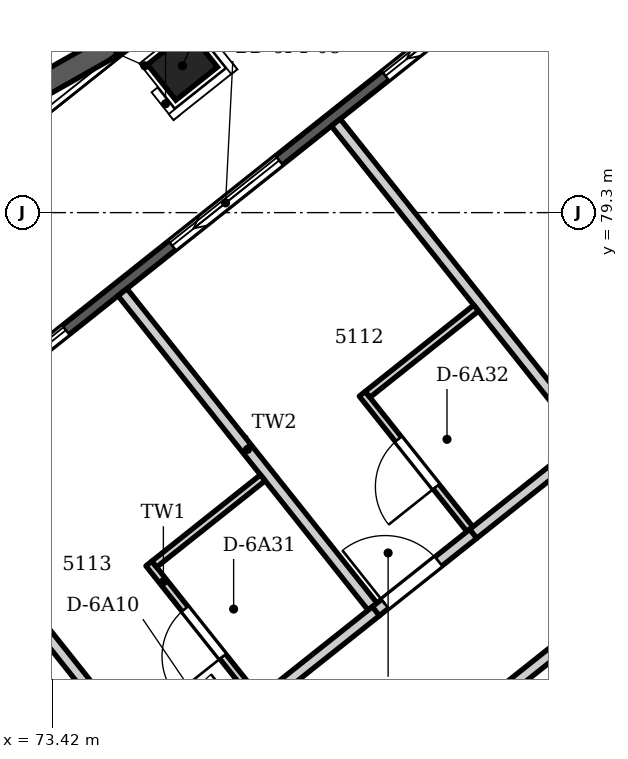
"""IFC4 building model, lengths in metres.
Left out: names, types, materials, properties, quantities, classifications, styles, units other than length and angle.
Written with IfcOpenShell. Run it as: python <this file> out.ifc"""

import sys

from ifc_helpers import new_model, si_unit, direction, frame, frame_2d, origin, origin_2d, place, context, subcontext, project, spatial, polyline, rectangle, outline, extrude, element, fill, save


model = new_model("IFC4")
c1 = context("Model", 3, precision=1e-05, world=origin(), true_north=direction((0.0, 1.0)))
c2 = subcontext(c1, "Body", "Model", "MODEL_VIEW")
j1 = project(units=[si_unit("LENGTHUNIT", "METRE"), si_unit("PLANEANGLEUNIT", "RADIAN")], contexts=[c1])
p1 = place(None, origin())
s1 = spatial("IfcSite", under=j1, at=p1, CompositionType="ELEMENT")
p2 = place(p1, origin())
s2 = spatial("IfcBuilding", under=s1, at=p2, CompositionType="ELEMENT")
p3 = place(p2, frame((0.0, 0.0, 198.0)))
s3 = spatial("IfcBuildingStorey", under=s2, at=p3, CompositionType="ELEMENT", Elevation=198.0)
p4 = place(p3, frame((75.131, 81.232, -0.35), z_axis=(0.0, 0.0, 1.0), x_axis=(0.782608156852, 0.622514636638, 0.0)))
e1 = element("IfcColumn", 1, at=p4, inside=s3, PredefinedType="COLUMN", context=c2, shape_type="SweptSolid", body=[
    extrude(rectangle(XDim=0.7, YDim=0.6, at=origin_2d()), origin(), (0.0, 0.0, 1.0), 3.95),
])
p5 = place(p3, frame((54.651, 62.686, 0.0), z_axis=(0.0, 0.0, 1.0), x_axis=(0.782609620341, 0.622512796776, 0.0)))
e2 = element("IfcWall", 2, at=p5, inside=s3, PredefinedType="SOLIDWALL", context=c2, shape_type="SweptSolid", body=[
    extrude(outline(polyline([(0.149, 0.075), (0.149, -0.075), (39.297, -0.075), (39.297, 0.075), (0.149, 0.075)])), origin(), (0.0, 0.0, 1.0), 3.3),
])
p6 = place(p5, frame((1.193, 0.0, 0.0)))
e3 = element("IfcOpeningElement", 3, at=p6, cuts=e2, PredefinedType="OPENING", context=c2, shape_type="SweptSolid", body=[
    extrude(rectangle(XDim=1.8, YDim=2.6, at=frame_2d((0.9, 1.3))), frame((0.0, 0.085, 0.0), z_axis=(0.0, -1.0, 0.0), x_axis=(1.0, 0.0, 0.0)), (0.0, 0.0, 1.0), 0.17),
])
p7 = place(p5, frame((4.479, 0.0, 0.0)))
e4 = element("IfcOpeningElement", 4, at=p7, cuts=e2, PredefinedType="OPENING", context=c2, shape_type="SweptSolid", body=[
    extrude(rectangle(XDim=1.8, YDim=2.6, at=frame_2d((0.9, 1.3))), frame((0.0, 0.085, 0.0), z_axis=(0.0, -1.0, 0.0), x_axis=(1.0, 0.0, 0.0)), (0.0, 0.0, 1.0), 0.17),
])
p8 = place(p5, frame((8.065, 0.0, 0.0)))
e5 = element("IfcOpeningElement", 5, at=p8, cuts=e2, PredefinedType="OPENING", context=c2, shape_type="SweptSolid", body=[
    extrude(rectangle(XDim=1.8, YDim=2.6, at=frame_2d((0.9, 1.3))), frame((0.0, 0.085, 0.0), z_axis=(0.0, -1.0, 0.0), x_axis=(1.0, 0.0, 0.0)), (0.0, 0.0, 1.0), 0.17),
])
p9 = place(p5, frame((11.651, 0.0, 0.0)))
e6 = element("IfcOpeningElement", 6, at=p9, cuts=e2, PredefinedType="OPENING", context=c2, shape_type="SweptSolid", body=[
    extrude(rectangle(XDim=1.8, YDim=2.6, at=frame_2d((0.9, 1.3))), frame((0.0, 0.085, 0.0), z_axis=(0.0, -1.0, 0.0), x_axis=(1.0, 0.0, 0.0)), (0.0, 0.0, 1.0), 0.17),
])
p10 = place(p5, frame((15.237, 0.0, 0.0)))
e7 = element("IfcOpeningElement", 7, at=p10, cuts=e2, PredefinedType="OPENING", context=c2, shape_type="SweptSolid", body=[
    extrude(rectangle(XDim=1.8, YDim=2.6, at=frame_2d((0.9, 1.3))), frame((0.0, 0.085, 0.0), z_axis=(0.0, -1.0, 0.0), x_axis=(1.0, 0.0, 0.0)), (0.0, 0.0, 1.0), 0.17),
])
p11 = place(p5, frame((18.823, 0.0, 0.0)))
e8 = element("IfcOpeningElement", 8, at=p11, cuts=e2, PredefinedType="OPENING", context=c2, shape_type="SweptSolid", body=[
    extrude(rectangle(XDim=1.8, YDim=2.6, at=frame_2d((0.9, 1.3))), frame((0.0, 0.085, 0.0), z_axis=(0.0, -1.0, 0.0), x_axis=(1.0, 0.0, 0.0)), (0.0, 0.0, 1.0), 0.17),
])
p12 = place(p5, frame((22.409, 0.0, 0.0)))
e9 = element("IfcOpeningElement", 9, at=p12, cuts=e2, PredefinedType="OPENING", context=c2, shape_type="SweptSolid", body=[
    extrude(rectangle(XDim=1.8, YDim=2.6, at=frame_2d((0.9, 1.3))), frame((0.0, 0.085, 0.0), z_axis=(0.0, -1.0, 0.0), x_axis=(1.0, 0.0, 0.0)), (0.0, 0.0, 1.0), 0.17),
])
p13 = place(p5, frame((25.995, 0.0, 0.0)))
e10 = element("IfcOpeningElement", 10, at=p13, cuts=e2, PredefinedType="OPENING", context=c2, shape_type="SweptSolid", body=[
    extrude(rectangle(XDim=1.8, YDim=2.6, at=frame_2d((0.9, 1.3))), frame((0.0, 0.085, 0.0), z_axis=(0.0, -1.0, 0.0), x_axis=(1.0, 0.0, 0.0)), (0.0, 0.0, 1.0), 0.17),
])
p14 = place(p5, frame((29.581, 0.0, 0.0)))
e11 = element("IfcOpeningElement", 11, at=p14, cuts=e2, PredefinedType="OPENING", context=c2, shape_type="SweptSolid", body=[
    extrude(rectangle(XDim=1.8, YDim=2.6, at=frame_2d((0.9, 1.3))), frame((0.0, 0.085, 0.0), z_axis=(0.0, -1.0, 0.0), x_axis=(1.0, 0.0, 0.0)), (0.0, 0.0, 1.0), 0.17),
])
p15 = place(p5, frame((33.167, 0.0, 0.0)))
e12 = element("IfcOpeningElement", 12, at=p15, cuts=e2, PredefinedType="OPENING", context=c2, shape_type="SweptSolid", body=[
    extrude(rectangle(XDim=1.8, YDim=2.6, at=frame_2d((0.9, 1.3))), frame((0.0, 0.085, 0.0), z_axis=(0.0, -1.0, 0.0), x_axis=(1.0, 0.0, 0.0)), (0.0, 0.0, 1.0), 0.17),
])
p16 = place(p5, frame((36.453, 0.0, 0.0)))
e13 = element("IfcOpeningElement", 13, at=p16, cuts=e2, PredefinedType="OPENING", context=c2, shape_type="SweptSolid", body=[
    extrude(rectangle(XDim=1.8, YDim=2.6, at=frame_2d((0.9, 1.3))), frame((0.0, 0.085, 0.0), z_axis=(0.0, -1.0, 0.0), x_axis=(1.0, 0.0, 0.0)), (0.0, 0.0, 1.0), 0.17),
])
p17 = place(p3, origin())
e14 = element("IfcWall", 14, at=p17, inside=s3, PredefinedType="PARAPET", context=c2, shape_type="SweptSolid", body=[
    extrude(outline(polyline([(75.979, 82.673), (46.956, 66.253), (47.255, 66.077), (74.479, 81.479), (75.979, 82.673)])), origin(), (0.0, 0.0, 1.0), 1.1),
])
p18 = place(p3, frame((71.536, 76.021, 0.0), z_axis=(0.0, 0.0, 1.0), x_axis=(0.622565407695, -0.782567769041, 0.0)))
e15 = element("IfcWall", 15, at=p18, inside=s3, PredefinedType="PARTITIONING", context=c2, shape_type="SweptSolid", body=[
    extrude(rectangle(XDim=5.36, YDim=0.15, at=frame_2d((2.68, 0.0))), origin(), (0.0, 0.0, 1.0), 3.3),
])
p19 = place(p3, frame((74.343, 78.253, 0.0), z_axis=(0.0, 0.0, 1.0), x_axis=(0.622444463897, -0.782663969634, 0.0)))
e16 = element("IfcWall", 16, at=p19, inside=s3, PredefinedType="PARTITIONING", context=c2, shape_type="SweptSolid", body=[
    extrude(rectangle(XDim=5.284, YDim=0.15, at=frame_2d((2.642, 0.0))), origin(), (0.0, 0.0, 1.0), 3.3),
])
p20 = place(p3, frame((74.69, 74.683, 0.0), z_axis=(0.0, 0.0, 1.0), x_axis=(0.622507134747, -0.782614124067, 0.0)))
e17 = element("IfcWall", 17, at=p20, inside=s3, PredefinedType="PARTITIONING", context=c2, shape_type="SweptSolid", body=[
    extrude(rectangle(XDim=2.275, YDim=0.1, at=frame_2d((1.138, 0.0))), origin(), (0.0, 0.0, 1.0), 3.3),
])
p21 = place(p20, frame((0.763, 0.0, 0.0)))
e18 = element("IfcOpeningElement", 18, at=p21, cuts=e17, PredefinedType="OPENING", context=c2, shape_type="SweptSolid", body=[
    extrude(rectangle(XDim=0.8, YDim=2.1, at=frame_2d((0.4, 1.05))), frame((0.0, 0.06, 0.0), z_axis=(0.0, -1.0, 0.0), x_axis=(1.0, 0.0, 0.0)), (0.0, 0.0, 1.0), 0.12),
])
p22 = place(p3, frame((74.76, 74.675, 0.0), z_axis=(0.0, 0.0, 1.0), x_axis=(0.782562542096, 0.622571977934, 0.0)))
e19 = element("IfcWall", 19, at=p22, inside=s3, PredefinedType="PARTITIONING", context=c2, shape_type="SweptSolid", body=[
    extrude(rectangle(XDim=1.825, YDim=0.1, at=frame_2d((0.913, 0.0))), origin(), (0.0, 0.0, 1.0), 3.3),
])
p23 = place(p3, frame((76.111, 72.811, 0.0), z_axis=(0.0, 0.0, 1.0), x_axis=(0.782704744495, 0.622393189989, 0.0)))
e20 = element("IfcWall", 20, at=p23, inside=s3, PredefinedType="PARTITIONING", context=c2, shape_type="SweptSolid", body=[
    extrude(rectangle(XDim=2.007, YDim=0.15, at=frame_2d((1.003, 0.0))), origin(), (0.0, 0.0, 1.0), 3.3),
])
p24 = place(p3, frame((77.149, 80.486, 0.0), z_axis=(0.0, 0.0, 1.0), x_axis=(0.622587598128, -0.782550115109, 0.0)))
e21 = element("IfcWall", 21, at=p24, inside=s3, PredefinedType="PARTITIONING", context=c2, shape_type="SweptSolid", body=[
    extrude(rectangle(XDim=5.36, YDim=0.15, at=frame_2d((2.68, 0.0))), origin(), (0.0, 0.0, 1.0), 3.3),
])
p25 = place(p3, frame((77.497, 76.916, 0.0), z_axis=(0.0, 0.0, 1.0), x_axis=(0.622625135388, -0.78252024944, 0.0)))
e22 = element("IfcWall", 22, at=p25, inside=s3, PredefinedType="PARTITIONING", context=c2, shape_type="SweptSolid", body=[
    extrude(rectangle(XDim=2.275, YDim=0.1, at=frame_2d((1.138, 0.0))), origin(), (0.0, 0.0, 1.0), 3.3),
])
p26 = place(p25, frame((0.763, 0.0, 0.0)))
e23 = element("IfcOpeningElement", 23, at=p26, cuts=e22, PredefinedType="OPENING", context=c2, shape_type="SweptSolid", body=[
    extrude(rectangle(XDim=0.8, YDim=2.1, at=frame_2d((0.4, 1.05))), frame((0.0, 0.06, 0.0), z_axis=(0.0, -1.0, 0.0), x_axis=(1.0, 0.0, 0.0)), (0.0, 0.0, 1.0), 0.12),
])
p27 = place(p3, frame((77.567, 76.908, 0.0), z_axis=(0.0, 0.0, 1.0), x_axis=(0.782627716851, 0.622490045557, 0.0)))
e24 = element("IfcWall", 24, at=p27, inside=s3, PredefinedType="PARTITIONING", context=c2, shape_type="SweptSolid", body=[
    extrude(rectangle(XDim=1.825, YDim=0.1, at=frame_2d((0.913, 0.0))), origin(), (0.0, 0.0, 1.0), 3.3),
])
p28 = place(p3, frame((77.676, 74.056, 0.0), z_axis=(0.0, 0.0, 1.0), x_axis=(0.782734219596, 0.622356121102, 0.0)))
e25 = element("IfcWall", 25, at=p28, inside=s3, PredefinedType="PARTITIONING", context=c2, shape_type="SweptSolid", body=[
    extrude(rectangle(XDim=1.644, YDim=0.15, at=frame_2d((0.822, 0.0))), origin(), (0.0, 0.0, 1.0), 3.3),
])
p29 = place(p28, frame((0.154, 0.0, 0.0)))
e26 = element("IfcOpeningElement", 26, at=p29, cuts=e25, PredefinedType="OPENING", context=c2, shape_type="SweptSolid", body=[
    extrude(rectangle(XDim=0.9, YDim=2.1, at=frame_2d((0.45, 1.05))), frame((0.0, 0.085, 0.0), z_axis=(0.0, -1.0, 0.0), x_axis=(1.0, 0.0, 0.0)), (0.0, 0.0, 1.0), 0.17),
])
p30 = place(p3, frame((78.957, 75.075, 0.0), z_axis=(0.0, 0.0, 1.0), x_axis=(0.782797783459, 0.622276168764, 0.0)))
e27 = element("IfcWall", 27, at=p30, inside=s3, PredefinedType="PARTITIONING", context=c2, shape_type="SweptSolid", body=[
    extrude(rectangle(XDim=1.676, YDim=0.15, at=frame_2d((0.838, 0.0))), origin(), (0.0, 0.0, 1.0), 3.3),
])
p31 = place(p3, frame((79.263, 72.922, 0.0), z_axis=(0.0, 0.0, 1.0), x_axis=(0.782518607784, 0.622627198629, 0.0)))
e28 = element("IfcWall", 28, at=p31, inside=s3, PredefinedType="PARTITIONING", context=c2, shape_type="SweptSolid", body=[
    extrude(rectangle(XDim=3.935, YDim=0.15, at=frame_2d((1.967, 0.0))), origin(), (0.0, 0.0, 1.0), 3.3),
])
p32 = place(p12, origin())
e29 = element("IfcDoor", 29, at=p32, inside=s3, OperationType="SLIDING_TO_LEFT", PredefinedType="DOOR", context=c2, shape_type="SweptSolid", body=[
    extrude(rectangle(XDim=1.8, YDim=2.6, at=frame_2d((0.9, 1.3))), frame((0.0, 0.025, 0.0), z_axis=(0.0, -1.0, 0.0), x_axis=(1.0, 0.0, 0.0)), (0.0, 0.0, 1.0), 0.05),
])
fill(e9, e29)
p33 = place(p13, origin())
e30 = element("IfcDoor", 30, at=p33, inside=s3, OperationType="SLIDING_TO_LEFT", PredefinedType="DOOR", context=c2, shape_type="SweptSolid", body=[
    extrude(rectangle(XDim=1.8, YDim=2.6, at=frame_2d((0.9, 1.3))), frame((0.0, 0.025, 0.0), z_axis=(0.0, -1.0, 0.0), x_axis=(1.0, 0.0, 0.0)), (0.0, 0.0, 1.0), 0.05),
])
fill(e10, e30)
p34 = place(p14, origin())
e31 = element("IfcDoor", 31, at=p34, inside=s3, OperationType="SLIDING_TO_LEFT", PredefinedType="DOOR", context=c2, shape_type="SweptSolid", body=[
    extrude(rectangle(XDim=1.8, YDim=2.6, at=frame_2d((0.9, 1.3))), frame((0.0, 0.025, 0.0), z_axis=(0.0, -1.0, 0.0), x_axis=(1.0, 0.0, 0.0)), (0.0, 0.0, 1.0), 0.05),
])
fill(e11, e31)
p35 = place(p29, origin())
e32 = element("IfcDoor", 32, at=p35, inside=s3, OperationType="SINGLE_SWING_LEFT", PredefinedType="DOOR", context=c2, shape_type="SweptSolid", body=[
    extrude(rectangle(XDim=0.9, YDim=2.1, at=frame_2d((0.45, 1.05))), frame((0.0, 0.025, 0.0), z_axis=(0.0, -1.0, 0.0), x_axis=(1.0, 0.0, 0.0)), (0.0, 0.0, 1.0), 0.05),
])
fill(e26, e32)
p36 = place(p21, frame((0.8, 0.0, 0.0), z_axis=(0.0, 0.0, 1.0), x_axis=(-1.0, 0.0, 0.0)))
e33 = element("IfcDoor", 33, at=p36, inside=s3, OperationType="SINGLE_SWING_LEFT", PredefinedType="DOOR", context=c2, shape_type="SweptSolid", body=[
    extrude(rectangle(XDim=0.8, YDim=2.1, at=frame_2d((0.4, 1.05))), frame((0.0, 0.025, 0.0), z_axis=(0.0, -1.0, 0.0), x_axis=(1.0, 0.0, 0.0)), (0.0, 0.0, 1.0), 0.05),
])
fill(e18, e33)
p37 = place(p26, frame((0.8, 0.0, 0.0), z_axis=(0.0, 0.0, 1.0), x_axis=(-1.0, 0.0, 0.0)))
e34 = element("IfcDoor", 34, at=p37, inside=s3, OperationType="SINGLE_SWING_LEFT", PredefinedType="DOOR", context=c2, shape_type="SweptSolid", body=[
    extrude(rectangle(XDim=0.8, YDim=2.1, at=frame_2d((0.4, 1.05))), frame((0.0, 0.025, 0.0), z_axis=(0.0, -1.0, 0.0), x_axis=(1.0, 0.0, 0.0)), (0.0, 0.0, 1.0), 0.05),
])
fill(e23, e34)
save(model, sys.argv[1])
